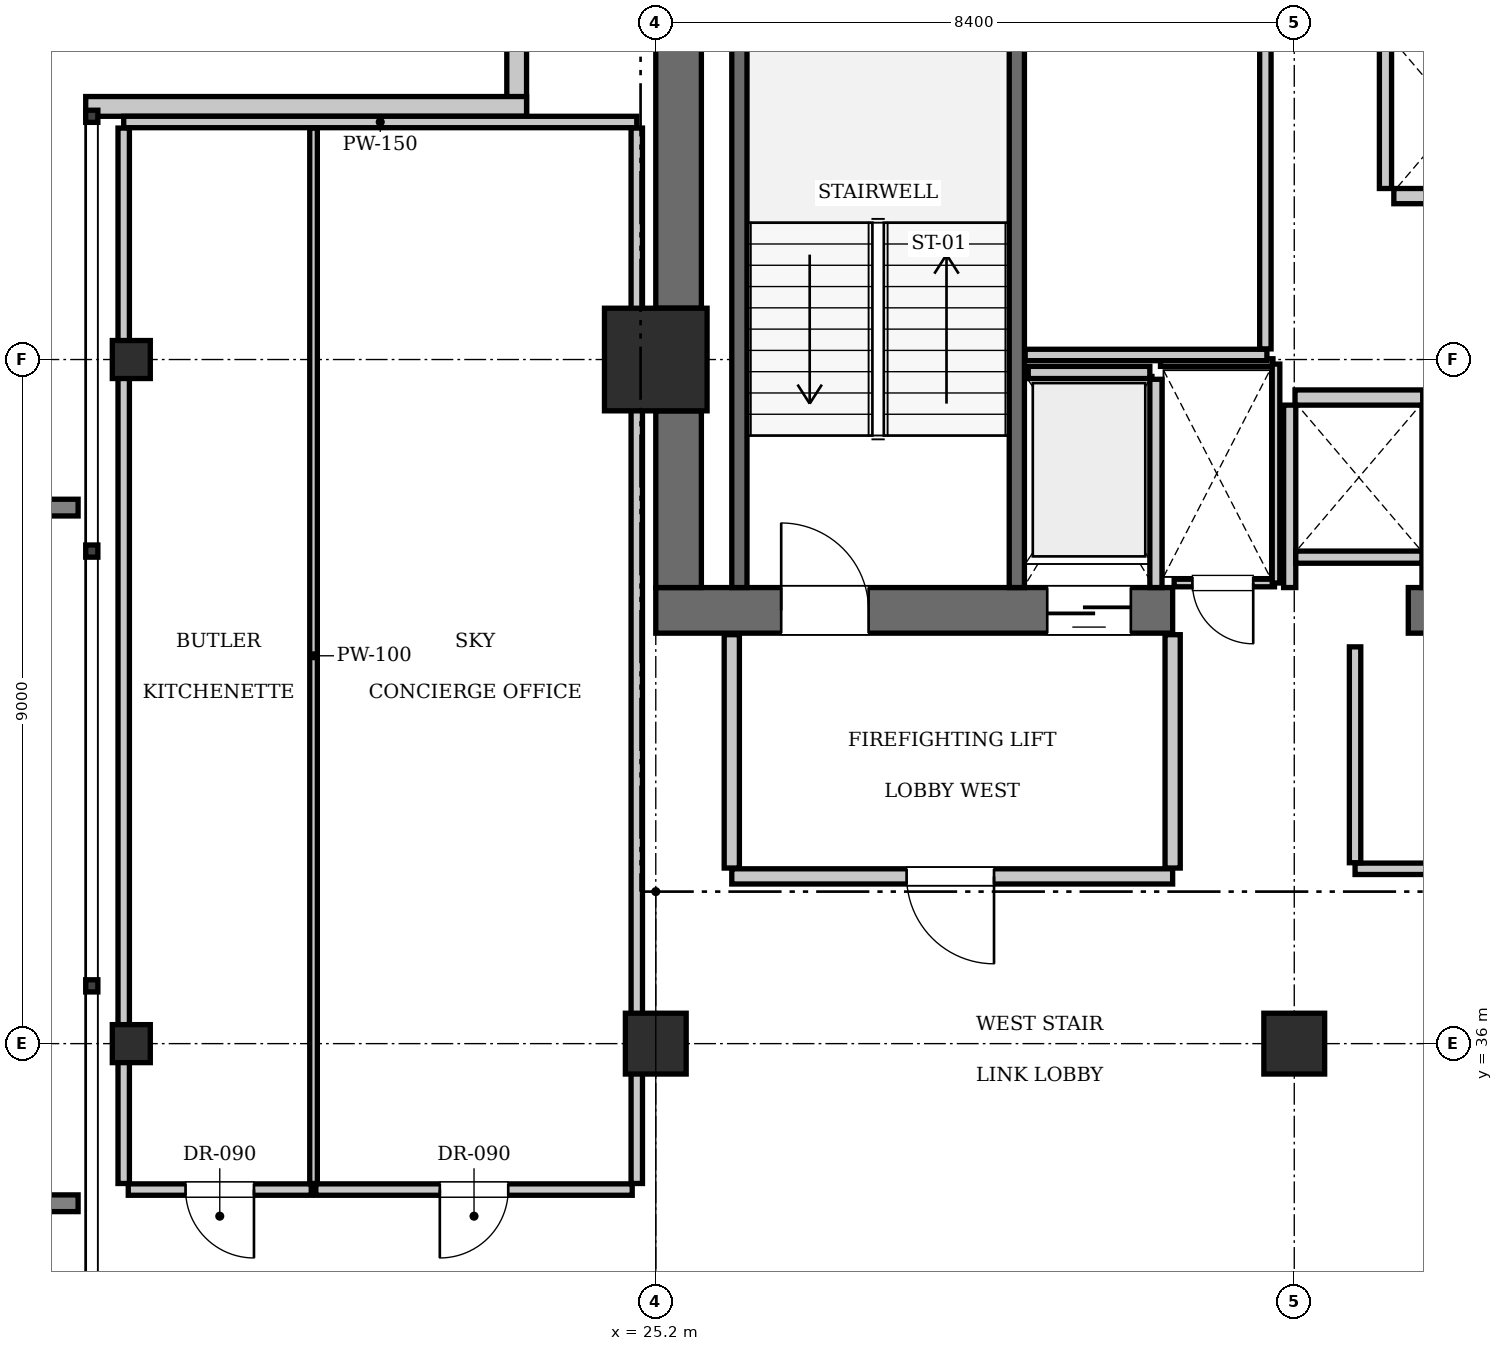
"""IFC4 building model, lengths in metres.
Left out: names, types, materials, properties, quantities, classifications, styles, units other than length and angle.
Written with IfcOpenShell. Run it as: python <this file> out.ifc"""

import sys

from ifc_helpers import new_model, si_unit, direction, frame, frame_2d, origin, origin_2d, place, context, subcontext, project, spatial, rectangle, i_section, extrude, element, fill, save


model = new_model("IFC4")
c1 = context("Model", 3, precision=1e-05, world=origin(), true_north=direction((0.0, 1.0)))
c2 = subcontext(c1, "Body", "Model", "MODEL_VIEW")
j1 = project(units=[si_unit("LENGTHUNIT", "METRE"), si_unit("PLANEANGLEUNIT", "RADIAN")], contexts=[c1])
p1 = place(None, origin())
s1 = spatial("IfcSite", under=j1, at=p1, CompositionType="ELEMENT")
p2 = place(p1, origin())
s2 = spatial("IfcBuilding", under=s1, at=p2, CompositionType="ELEMENT")
p3 = place(p2, frame((0.0, 0.0, 325.85)))
s3 = spatial("IfcBuildingStorey", under=s2, at=p3, CompositionType="ELEMENT", Elevation=325.85)
p4 = place(p3, frame((25.2, 45.0, 0.0), z_axis=(0.0, 0.0, 1.0), x_axis=(1.0, 0.0, 0.0)))
e1 = element("IfcColumn", 1, at=p4, inside=s3, PredefinedType="COLUMN", context=c2, shape_type="SweptSolid", body=[
    extrude(rectangle(XDim=1.35, YDim=1.35, at=origin_2d()), origin(), (0.0, 0.0, 1.0), 3.85),
])
p5 = place(p3, frame((25.2, 41.7, 0.0), z_axis=(0.0, 0.0, 1.0), x_axis=(1.0, 0.0, 0.0)))
e2 = element("IfcWall", 2, at=p5, inside=s3, PredefinedType="SHEAR", context=c2, shape_type="SweptSolid", body=[
    extrude(rectangle(XDim=6.8, YDim=0.6, at=frame_2d((3.4, 0.0))), origin(), (0.0, 0.0, 1.0), 3.85),
])
p6 = place(p5, frame((1.65, 0.0, 0.0)))
e3 = element("IfcOpeningElement", 3, at=p6, cuts=e2, PredefinedType="OPENING", context=c2, shape_type="SweptSolid", body=[
    extrude(rectangle(XDim=1.15, YDim=2.15, at=frame_2d((0.575, 1.075))), frame((0.0, 0.31, 0.0), z_axis=(0.0, -1.0, 0.0), x_axis=(1.0, 0.0, 0.0)), (0.0, 0.0, 1.0), 0.62),
])
p7 = place(p5, frame((5.15, 0.0, 0.0)))
e4 = element("IfcOpeningElement", 4, at=p7, cuts=e2, PredefinedType="OPENING", context=c2, shape_type="SweptSolid", body=[
    extrude(rectangle(XDim=1.1, YDim=2.2, at=frame_2d((0.55, 1.1))), frame((0.0, 0.31, 0.0), z_axis=(0.0, -1.0, 0.0), x_axis=(1.0, 0.0, 0.0)), (0.0, 0.0, 1.0), 0.62),
])
p8 = place(p3, frame((35.1, 41.7, 0.0), z_axis=(0.0, 0.0, 1.0), x_axis=(1.0, 0.0, 0.0)))
e5 = element("IfcWall", 5, at=p8, inside=s3, PredefinedType="SHEAR", context=c2, shape_type="SweptSolid", body=[
    extrude(rectangle(XDim=5.4, YDim=0.6, at=frame_2d((2.7, 0.0))), origin(), (0.0, 0.0, 1.0), 3.85),
])
p9 = place(p3, frame((25.5, 42.0, 0.0), z_axis=(0.0, 0.0, 1.0), x_axis=(0.0, 1.0, 0.0)))
e6 = element("IfcWall", 6, at=p9, inside=s3, PredefinedType="SHEAR", context=c2, shape_type="SweptSolid", body=[
    extrude(rectangle(XDim=2.325, YDim=0.6, at=frame_2d((1.163, 0.0))), origin(), (0.0, 0.0, 1.0), 3.85),
])
p10 = place(p3, frame((25.5, 45.675, 0.0), z_axis=(0.0, 0.0, 1.0), x_axis=(0.0, 1.0, 0.0)))
e7 = element("IfcWall", 7, at=p10, inside=s3, PredefinedType="SHEAR", context=c2, shape_type="SweptSolid", body=[
    extrude(rectangle(XDim=7.725, YDim=0.6, at=frame_2d((3.862, 0.0))), origin(), (0.0, 0.0, 1.0), 3.85),
])
for number, where, z_axis, x_axis in (
    (8, (25.2, 36.0, 0.0), (0.0, 0.0, 1.0), (1.0, 0.0, 0.0)),
    (9, (33.6, 36.0, 0.0), (0.0, 0.0, 1.0), (1.0, 0.0, 0.0)),
):
    element("IfcColumn", number, at=place(p3, frame(where, z_axis=z_axis, x_axis=x_axis)), inside=s3, PredefinedType="COLUMN", context=c2, shape_type="SweptSolid", body=[
        extrude(rectangle(XDim=0.8, YDim=0.8, at=origin_2d()), origin(), (0.0, 0.0, 1.0), 3.85),
    ])
for number, where, z_axis, x_axis in (
    (10, (18.3, 36.0, 0.0), (0.0, 0.0, 1.0), (1.0, 0.0, 0.0)),
    (11, (18.3, 45.0, 0.0), (0.0, 0.0, 1.0), (1.0, 0.0, 0.0)),
):
    element("IfcColumn", number, at=place(p3, frame(where, z_axis=z_axis, x_axis=x_axis)), inside=s3, PredefinedType="COLUMN", context=c2, shape_type="SweptSolid", body=[
        extrude(i_section(OverallWidth=0.5, OverallDepth=0.5, WebThickness=0.022, FlangeThickness=0.032, at=origin_2d()), origin(), (0.0, 0.0, 1.0), 3.85),
    ])
p11 = place(p3, frame((29.95, 42.0, 0.0), z_axis=(0.0, 0.0, 1.0), x_axis=(0.0, 1.0, 0.0)))
e12 = element("IfcWall", 12, at=p11, inside=s3, PredefinedType="SOLIDWALL", context=c2, shape_type="SweptSolid", body=[
    extrude(rectangle(XDim=9.15, YDim=0.2, at=frame_2d((4.575, 0.0))), origin(), (0.0, 0.0, 1.0), 3.61),
])
p12 = place(p3, frame((26.3, 42.0, 0.0), z_axis=(0.0, 0.0, 1.0), x_axis=(0.0, 1.0, 0.0)))
e13 = element("IfcWall", 13, at=p12, inside=s3, PredefinedType="SOLIDWALL", context=c2, shape_type="SweptSolid", body=[
    extrude(rectangle(XDim=9.12, YDim=0.2, at=frame_2d((4.56, 0.0))), origin(), (0.0, 0.0, 1.0), 3.61),
])
p13 = place(p3, frame((34.91, 47.15, 0.0), z_axis=(0.0, 0.0, 1.0), x_axis=(1.0, 0.0, 0.0)))
e14 = element("IfcWall", 14, at=p13, inside=s3, PredefinedType="SOLIDWALL", context=c2, shape_type="SweptSolid", body=[
    extrude(rectangle(XDim=1.68, YDim=0.2, at=frame_2d((0.84, 0.0))), origin(), (0.0, 0.0, 1.0), 3.61),
])
p14 = place(p3, frame((33.61, 44.5, 0.0), z_axis=(0.0, 0.0, 1.0), x_axis=(1.0, 0.0, 0.0)))
e15 = element("IfcWall", 15, at=p14, inside=s3, PredefinedType="SOLIDWALL", context=c2, shape_type="SweptSolid", body=[
    extrude(rectangle(XDim=1.68, YDim=0.2, at=frame_2d((0.84, 0.0))), origin(), (0.0, 0.0, 1.0), 3.61),
])
p15 = place(p3, frame((30.1, 44.83, 0.0), z_axis=(0.0, 0.0, 1.0), x_axis=(1.0, 0.0, 0.0)))
e16 = element("IfcWall", 16, at=p15, inside=s3, PredefinedType="SOLIDWALL", context=c2, shape_type="SweptSolid", body=[
    extrude(rectangle(XDim=1.6, YDim=0.16, at=frame_2d((0.8, 0.0))), origin(), (0.0, 0.0, 1.0), 3.61),
])
p16 = place(p3, frame((31.78, 42.0, 0.0), z_axis=(0.0, 0.0, 1.0), x_axis=(0.0, 1.0, 0.0)))
e17 = element("IfcWall", 17, at=p16, inside=s3, PredefinedType="SOLIDWALL", context=c2, shape_type="SweptSolid", body=[
    extrude(rectangle(XDim=2.74, YDim=0.16, at=frame_2d((1.37, 0.0))), origin(), (0.0, 0.0, 1.0), 3.61),
])
p17 = place(p3, frame((34.8, 47.25, 0.0), z_axis=(0.0, 0.0, 1.0), x_axis=(0.0, 1.0, 0.0)))
e18 = element("IfcWall", 18, at=p17, inside=s3, PredefinedType="SOLIDWALL", context=c2, shape_type="SweptSolid", body=[
    extrude(rectangle(XDim=2.19, YDim=0.16, at=frame_2d((1.095, 0.0))), origin(), (0.0, 0.0, 1.0), 3.61),
])
for number, where, z_axis, x_axis in (
    (19, (33.54, 42.0, 0.0), (0.0, 0.0, 1.0), (0.0, 1.0, 0.0)),
    (20, (35.36, 42.0, 0.0), (0.0, 0.0, 1.0), (0.0, 1.0, 0.0)),
):
    element("IfcWall", number, at=place(p3, frame(where, z_axis=z_axis, x_axis=x_axis)), inside=s3, PredefinedType="SOLIDWALL", context=c2, shape_type="SweptSolid", body=[
        extrude(rectangle(XDim=2.4, YDim=0.16, at=frame_2d((1.2, 0.0))), origin(), (0.0, 0.0, 1.0), 3.61),
    ])
p18 = place(p3, frame((33.62, 42.4, 0.0), z_axis=(0.0, 0.0, 1.0), x_axis=(1.0, 0.0, 0.0)))
e21 = element("IfcWall", 21, at=p18, inside=s3, PredefinedType="SOLIDWALL", context=c2, shape_type="SweptSolid", body=[
    extrude(rectangle(XDim=1.66, YDim=0.16, at=frame_2d((0.83, 0.0))), origin(), (0.0, 0.0, 1.0), 3.61),
])
for number, where, z_axis, x_axis in (
    (22, (23.37, 48.2, 0.0), (0.0, 0.0, 1.0), (0.0, 1.0, 0.0)),
    (23, (17.7, 48.33, 0.0), (0.0, 0.0, 1.0), (1.0, 0.0, 0.0)),
):
    element("IfcWall", number, at=place(p3, frame(where, z_axis=z_axis, x_axis=x_axis)), inside=s3, PredefinedType="SOLIDWALL", context=c2, shape_type="SweptSolid", body=[
        extrude(rectangle(XDim=5.8, YDim=0.26, at=frame_2d((2.9, 0.0))), origin(), (0.0, 0.0, 1.0), 3.61),
    ])
p19 = place(p3, frame((26.2, 38.2, 0.0), z_axis=(0.0, 0.0, 1.0), x_axis=(1.0, 0.0, 0.0)))
e24 = element("IfcWall", 24, at=p19, inside=s3, PredefinedType="PARTITIONING", context=c2, shape_type="SweptSolid", body=[
    extrude(rectangle(XDim=5.8, YDim=0.2, at=frame_2d((2.9, 0.0))), origin(), (0.0, 0.0, 1.0), 3.61),
])
p20 = place(p19, frame((2.3, 0.0, 0.0)))
e25 = element("IfcOpeningElement", 25, at=p20, cuts=e24, PredefinedType="OPENING", context=c2, shape_type="SweptSolid", body=[
    extrude(rectangle(XDim=1.15, YDim=2.15, at=frame_2d((0.575, 1.075))), frame((0.0, 0.11, 0.0), z_axis=(0.0, -1.0, 0.0), x_axis=(1.0, 0.0, 0.0)), (0.0, 0.0, 1.0), 0.22),
])
for number, where, z_axis, x_axis in (
    (26, (26.2, 38.31, 0.0), (0.0, 0.0, 1.0), (0.0, 1.0, 0.0)),
    (27, (32.0, 38.31, 0.0), (0.0, 0.0, 1.0), (0.0, 1.0, 0.0)),
):
    element("IfcWall", number, at=place(p3, frame(where, z_axis=z_axis, x_axis=x_axis)), inside=s3, PredefinedType="PARTITIONING", context=c2, shape_type="SweptSolid", body=[
        extrude(rectangle(XDim=3.07, YDim=0.2, at=frame_2d((1.535, 0.0))), origin(), (0.0, 0.0, 1.0), 3.61),
    ])
p21 = place(p3, frame((32.02, 42.06, 0.0), z_axis=(0.0, 0.0, 1.0), x_axis=(1.0, 0.0, 0.0)))
e28 = element("IfcWall", 28, at=p21, inside=s3, PredefinedType="PARTITIONING", context=c2, shape_type="SweptSolid", body=[
    extrude(rectangle(XDim=1.32, YDim=0.1, at=frame_2d((0.66, 0.0))), origin(), (0.0, 0.0, 1.0), 3.61),
])
p22 = place(p21, frame((0.24, 0.0, 0.0)))
e29 = element("IfcOpeningElement", 29, at=p22, cuts=e28, PredefinedType="OPENING", context=c2, shape_type="SweptSolid", body=[
    extrude(rectangle(XDim=0.8, YDim=2.05, at=frame_2d((0.4, 1.025))), frame((0.0, 0.06, 0.0), z_axis=(0.0, -1.0, 0.0), x_axis=(1.0, 0.0, 0.0)), (0.0, 0.0, 1.0), 0.12),
])
p23 = place(p3, frame((31.84, 44.96, 0.0), z_axis=(0.0, 0.0, 1.0), x_axis=(1.0, 0.0, 0.0)))
e30 = element("IfcWall", 30, at=p23, inside=s3, PredefinedType="PARTITIONING", context=c2, shape_type="SweptSolid", body=[
    extrude(rectangle(XDim=1.48, YDim=0.1, at=frame_2d((0.74, 0.0))), origin(), (0.0, 0.0, 1.0), 3.61),
])
p24 = place(p3, frame((33.36, 42.06, 0.0), z_axis=(0.0, 0.0, 1.0), x_axis=(0.0, 1.0, 0.0)))
e31 = element("IfcWall", 31, at=p24, inside=s3, PredefinedType="PARTITIONING", context=c2, shape_type="SweptSolid", body=[
    extrude(rectangle(XDim=2.88, YDim=0.1, at=frame_2d((1.44, 0.0))), origin(), (0.0, 0.0, 1.0), 3.61),
])
p25 = place(p3, frame((30.06, 45.06, 0.0), z_axis=(0.0, 0.0, 1.0), x_axis=(1.0, 0.0, 0.0)))
e32 = element("IfcWall", 32, at=p25, inside=s3, PredefinedType="PARTITIONING", context=c2, shape_type="SweptSolid", body=[
    extrude(rectangle(XDim=3.18, YDim=0.15, at=frame_2d((1.59, 0.0))), origin(), (0.0, 0.0, 1.0), 3.61),
])
p26 = place(p3, frame((33.22, 45.14, 0.0), z_axis=(0.0, 0.0, 1.0), x_axis=(0.0, 1.0, 0.0)))
e33 = element("IfcWall", 33, at=p26, inside=s3, PredefinedType="PARTITIONING", context=c2, shape_type="SweptSolid", body=[
    extrude(rectangle(XDim=4.16, YDim=0.15, at=frame_2d((2.08, 0.0))), origin(), (0.0, 0.0, 1.0), 3.61),
])
p27 = place(p3, frame((34.4, 38.3, 0.0), z_axis=(0.0, 0.0, 1.0), x_axis=(1.0, 0.0, 0.0)))
e34 = element("IfcWall", 34, at=p27, inside=s3, PredefinedType="PARTITIONING", context=c2, shape_type="SweptSolid", body=[
    extrude(rectangle(XDim=2.88, YDim=0.15, at=frame_2d((1.44, 0.0))), origin(), (0.0, 0.0, 1.0), 3.61),
])
p28 = place(p27, frame((1.0, 0.0, 0.0)))
e35 = element("IfcOpeningElement", 35, at=p28, cuts=e34, PredefinedType="OPENING", context=c2, shape_type="SweptSolid", body=[
    extrude(rectangle(XDim=0.8, YDim=2.05, at=frame_2d((0.4, 1.025))), frame((0.0, 0.085, 0.0), z_axis=(0.0, -1.0, 0.0), x_axis=(1.0, 0.0, 0.0)), (0.0, 0.0, 1.0), 0.17),
])
p29 = place(p3, frame((34.4, 38.38, 0.0), z_axis=(0.0, 0.0, 1.0), x_axis=(0.0, 1.0, 0.0)))
e36 = element("IfcWall", 36, at=p29, inside=s3, PredefinedType="PARTITIONING", context=c2, shape_type="SweptSolid", body=[
    extrude(rectangle(XDim=2.84, YDim=0.15, at=frame_2d((1.42, 0.0))), origin(), (0.0, 0.0, 1.0), 3.61),
])
p30 = place(p3, frame((18.2, 48.125, 0.0), z_axis=(0.0, 0.0, 1.0), x_axis=(1.0, 0.0, 0.0)))
e37 = element("IfcWall", 37, at=p30, inside=s3, PredefinedType="PARTITIONING", context=c2, shape_type="SweptSolid", body=[
    extrude(rectangle(XDim=6.75, YDim=0.15, at=frame_2d((3.375, 0.0))), origin(), (0.0, 0.0, 1.0), 3.61),
])
p31 = place(p3, frame((18.2, 34.16, 0.0), z_axis=(0.0, 0.0, 1.0), x_axis=(0.0, 1.0, 0.0)))
e38 = element("IfcWall", 38, at=p31, inside=s3, PredefinedType="PARTITIONING", context=c2, shape_type="SweptSolid", body=[
    extrude(rectangle(XDim=13.885, YDim=0.15, at=frame_2d((6.942, 0.0))), origin(), (0.0, 0.0, 1.0), 3.141),
])
p32 = place(p3, frame((24.95, 34.16, 0.0), z_axis=(0.0, 0.0, 1.0), x_axis=(0.0, 1.0, 0.0)))
e39 = element("IfcWall", 39, at=p32, inside=s3, PredefinedType="PARTITIONING", context=c2, shape_type="SweptSolid", body=[
    extrude(rectangle(XDim=13.885, YDim=0.15, at=frame_2d((6.942, 0.0))), origin(), (0.0, 0.0, 1.0), 3.61),
])
p33 = place(p3, frame((18.26, 34.08, 0.0), z_axis=(0.0, 0.0, 1.0), x_axis=(1.0, 0.0, 0.0)))
e40 = element("IfcWall", 40, at=p33, inside=s3, PredefinedType="PARTITIONING", context=c2, shape_type="SweptSolid", body=[
    extrude(rectangle(XDim=2.407, YDim=0.15, at=frame_2d((1.204, 0.0))), origin(), (0.0, 0.0, 1.0), 3.61),
])
p34 = place(p33, frame((0.754, 0.0, 0.0)))
e41 = element("IfcOpeningElement", 41, at=p34, cuts=e40, PredefinedType="OPENING", context=c2, shape_type="SweptSolid", body=[
    extrude(rectangle(XDim=0.9, YDim=2.1, at=frame_2d((0.45, 1.05))), frame((0.0, 0.085, 0.0), z_axis=(0.0, -1.0, 0.0), x_axis=(1.0, 0.0, 0.0)), (0.0, 0.0, 1.0), 0.17),
])
p35 = place(p3, frame((20.698, 34.16, 0.0), z_axis=(0.0, 0.0, 1.0), x_axis=(0.0, 1.0, 0.0)))
e42 = element("IfcWall", 42, at=p35, inside=s3, PredefinedType="PARTITIONING", context=c2, shape_type="SweptSolid", body=[
    extrude(rectangle(XDim=13.885, YDim=0.1, at=frame_2d((6.942, 0.0))), origin(), (0.0, 0.0, 1.0), 3.61),
])
p36 = place(p3, frame((20.728, 34.08, 0.0), z_axis=(0.0, 0.0, 1.0), x_axis=(1.0, 0.0, 0.0)))
e43 = element("IfcWall", 43, at=p36, inside=s3, PredefinedType="PARTITIONING", context=c2, shape_type="SweptSolid", body=[
    extrude(rectangle(XDim=4.162, YDim=0.15, at=frame_2d((2.081, 0.0))), origin(), (0.0, 0.0, 1.0), 3.61),
])
p37 = place(p36, frame((1.631, 0.0, 0.0)))
e44 = element("IfcOpeningElement", 44, at=p37, cuts=e43, PredefinedType="OPENING", context=c2, shape_type="SweptSolid", body=[
    extrude(rectangle(XDim=0.9, YDim=2.1, at=frame_2d((0.45, 1.05))), frame((0.0, 0.085, 0.0), z_axis=(0.0, -1.0, 0.0), x_axis=(1.0, 0.0, 0.0)), (0.0, 0.0, 1.0), 0.17),
])
p38 = place(p6, origin())
e45 = element("IfcDoor", 45, at=p38, inside=s3, OperationType="SINGLE_SWING_LEFT", PredefinedType="DOOR", context=c2, shape_type="SweptSolid", body=[
    extrude(rectangle(XDim=1.15, YDim=2.15, at=frame_2d((0.575, 1.075))), frame((0.0, 0.025, 0.0), z_axis=(0.0, -1.0, 0.0), x_axis=(1.0, 0.0, 0.0)), (0.0, 0.0, 1.0), 0.05),
])
fill(e3, e45)
p39 = place(p7, frame((1.1, 0.0, 0.0), z_axis=(0.0, 0.0, 1.0), x_axis=(-1.0, 0.0, 0.0)))
e46 = element("IfcDoor", 46, at=p39, inside=s3, OperationType="SLIDING_TO_LEFT", PredefinedType="DOOR", context=c2, shape_type="SweptSolid", body=[
    extrude(rectangle(XDim=1.1, YDim=2.2, at=frame_2d((0.55, 1.1))), frame((0.0, 0.025, 0.0), z_axis=(0.0, -1.0, 0.0), x_axis=(1.0, 0.0, 0.0)), (0.0, 0.0, 1.0), 0.05),
])
fill(e4, e46)
p40 = place(p20, frame((1.15, 0.0, 0.0), z_axis=(0.0, 0.0, 1.0), x_axis=(-1.0, 0.0, 0.0)))
e47 = element("IfcDoor", 47, at=p40, inside=s3, OperationType="SINGLE_SWING_LEFT", PredefinedType="DOOR", context=c2, shape_type="SweptSolid", body=[
    extrude(rectangle(XDim=1.15, YDim=2.15, at=frame_2d((0.575, 1.075))), frame((0.0, 0.025, 0.0), z_axis=(0.0, -1.0, 0.0), x_axis=(1.0, 0.0, 0.0)), (0.0, 0.0, 1.0), 0.05),
])
fill(e25, e47)
p41 = place(p22, frame((0.8, 0.0, 0.0), z_axis=(0.0, 0.0, 1.0), x_axis=(-1.0, 0.0, 0.0)))
e48 = element("IfcDoor", 48, at=p41, inside=s3, OperationType="SINGLE_SWING_LEFT", PredefinedType="DOOR", context=c2, shape_type="SweptSolid", body=[
    extrude(rectangle(XDim=0.8, YDim=2.05, at=frame_2d((0.4, 1.025))), frame((0.0, 0.025, 0.0), z_axis=(0.0, -1.0, 0.0), x_axis=(1.0, 0.0, 0.0)), (0.0, 0.0, 1.0), 0.05),
])
fill(e29, e48)
p42 = place(p34, frame((0.9, 0.0, 0.0), z_axis=(0.0, 0.0, 1.0), x_axis=(-1.0, 0.0, 0.0)))
e49 = element("IfcDoor", 49, at=p42, inside=s3, OperationType="SINGLE_SWING_LEFT", PredefinedType="DOOR", context=c2, shape_type="SweptSolid", body=[
    extrude(rectangle(XDim=0.9, YDim=2.1, at=frame_2d((0.45, 1.05))), frame((0.0, 0.025, 0.0), z_axis=(0.0, -1.0, 0.0), x_axis=(1.0, 0.0, 0.0)), (0.0, 0.0, 1.0), 0.05),
])
fill(e41, e49)
p43 = place(p37, frame((0.9, 0.0, 0.0), z_axis=(0.0, 0.0, 1.0), x_axis=(-1.0, 0.0, 0.0)))
e50 = element("IfcDoor", 50, at=p43, inside=s3, OperationType="SINGLE_SWING_RIGHT", PredefinedType="DOOR", context=c2, shape_type="SweptSolid", body=[
    extrude(rectangle(XDim=0.9, YDim=2.1, at=frame_2d((0.45, 1.05))), frame((0.0, 0.025, 0.0), z_axis=(0.0, -1.0, 0.0), x_axis=(1.0, 0.0, 0.0)), (0.0, 0.0, 1.0), 0.05),
])
fill(e44, e50)
save(model, sys.argv[1])
